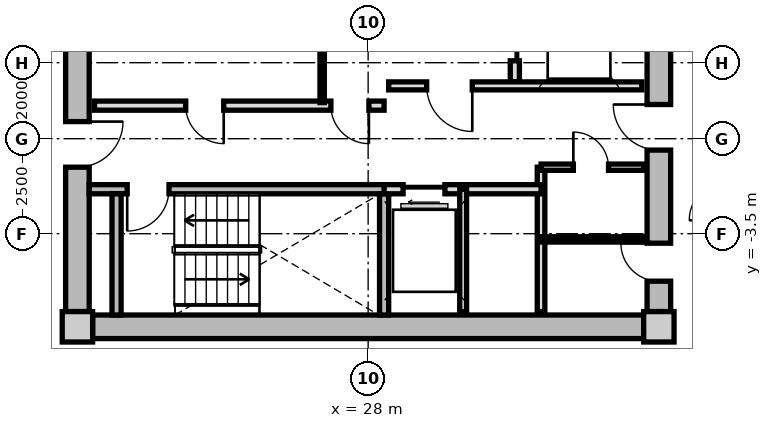
"""IFC4 building model, lengths in metres.
Left out: names, types, materials, properties, quantities, classifications, styles, units other than length and angle.
Written with IfcOpenShell. Run it as: python <this file> out.ifc"""

import sys

from ifc_helpers import new_model, si_unit, direction, frame, frame_2d, origin, origin_2d, place, context, subcontext, project, spatial, rectangle, extrude, source, transform, mapped, element, fill, save


model = new_model("IFC4")
c1 = context("Model", 3, precision=1e-05, world=origin(), true_north=direction((0.0, 1.0)))
c2 = subcontext(c1, "Body", "Model", "MODEL_VIEW")
j1 = project(units=[si_unit("LENGTHUNIT", "METRE"), si_unit("PLANEANGLEUNIT", "RADIAN")], contexts=[c1])
p1 = place(None, origin())
s1 = spatial("IfcSite", under=j1, at=p1, CompositionType="ELEMENT")
p2 = place(p1, origin())
s2 = spatial("IfcBuilding", under=s1, at=p2, CompositionType="ELEMENT")
p3 = place(p2, frame((0.0, 0.0, 152.6)))
s3 = spatial("IfcBuildingStorey", under=s2, at=p3, CompositionType="ELEMENT", Elevation=152.6)
m1 = source(origin(), c2, "Body", "SweptSolid", [
    extrude(rectangle(XDim=0.8, YDim=0.8, at=origin_2d()), origin(), (0.0, 0.0, 1.0), 3.05),
])
for number, where, z_axis, x_axis in (
    (1, (20.35, -5.95, 0.0), (0.0, 0.0, 1.0), (1.0, 0.0, 0.0)),
    (2, (35.65, -5.95, 0.0), (0.0, 0.0, 1.0), (1.0, 0.0, 0.0)),
):
    element("IfcColumn", number, at=place(p3, frame(where, z_axis=z_axis, x_axis=x_axis)), inside=s3, PredefinedType="COLUMN", context=c2, shape_type="MappedRepresentation", body=[
        mapped(m1, transform((0.0, 0.0, 0.0), x_axis=(1.0, 0.0, 0.0), y_axis=(0.0, 1.0, 0.0), z_axis=(0.0, 0.0, 1.0), scale=1.0)),
    ])
m2 = source(origin(), c2, "Body", "SweptSolid", [
    extrude(rectangle(XDim=14.5, YDim=0.62, at=frame_2d((7.25, 0.0))), origin(), (0.0, 0.0, 1.0), 2.81),
])
p4 = place(p3, frame((35.25, -5.95, 0.0), z_axis=(0.0, 0.0, 1.0), x_axis=(-1.0, 0.0, 0.0)))
e3 = element("IfcWall", 3, at=p4, inside=s3, PredefinedType="SHEAR", context=c2, shape_type="MappedRepresentation", body=[
    mapped(m2, transform((0.0, 0.0, 0.0), x_axis=(1.0, 0.0, 0.0), y_axis=(0.0, 1.0, 0.0), z_axis=(0.0, 0.0, 1.0), scale=1.0)),
])
m3 = source(origin(), c2, "Body", "SweptSolid", [
    extrude(rectangle(XDim=11.1, YDim=0.62, at=frame_2d((5.55, 0.0))), origin(), (0.0, 0.0, 1.0), 2.81),
])
p5 = place(p3, frame((20.35, -5.55, 0.0), z_axis=(0.0, 0.0, 1.0), x_axis=(0.0, 1.0, 0.0)))
e4 = element("IfcWall", 4, at=p5, inside=s3, PredefinedType="SHEAR", context=c2, shape_type="MappedRepresentation", body=[
    mapped(m3, transform((0.0, 0.0, 0.0), x_axis=(1.0, 0.0, 0.0), y_axis=(0.0, 1.0, 0.0), z_axis=(0.0, 0.0, 1.0), scale=1.0)),
])
p6 = place(p5, frame((3.8, 0.0, 0.0)))
e5 = element("IfcOpeningElement", 5, at=p6, cuts=e4, PredefinedType="OPENING", context=c2, shape_type="SweptSolid", body=[
    extrude(rectangle(XDim=1.2, YDim=2.15, at=frame_2d((0.6, 1.075))), frame((0.0, 0.32, 0.0), z_axis=(0.0, -1.0, 0.0), x_axis=(1.0, 0.0, 0.0)), (0.0, 0.0, 1.0), 0.64),
])
p7 = place(p3, frame((35.65, 5.55, 0.0), z_axis=(0.0, 0.0, 1.0), x_axis=(0.0, -1.0, 0.0)))
e6 = element("IfcWall", 6, at=p7, inside=s3, PredefinedType="SHEAR", context=c2, shape_type="MappedRepresentation", body=[
    mapped(m3, transform((0.0, 0.0, 0.0), x_axis=(1.0, 0.0, 0.0), y_axis=(0.0, 1.0, 0.0), z_axis=(0.0, 0.0, 1.0), scale=1.0)),
])
p8 = place(p7, frame((5.65, 0.0, 0.0)))
e7 = element("IfcOpeningElement", 7, at=p8, cuts=e6, PredefinedType="OPENING", context=c2, shape_type="SweptSolid", body=[
    extrude(rectangle(XDim=1.2, YDim=2.15, at=frame_2d((0.6, 1.075))), frame((0.0, 0.32, 0.0), z_axis=(0.0, -1.0, 0.0), x_axis=(1.0, 0.0, 0.0)), (0.0, 0.0, 1.0), 0.64),
])
p9 = place(p7, frame((9.3, 0.0, 0.0)))
e8 = element("IfcOpeningElement", 8, at=p9, cuts=e6, PredefinedType="OPENING", context=c2, shape_type="SweptSolid", body=[
    extrude(rectangle(XDim=1.0, YDim=2.1, at=frame_2d((0.5, 1.05))), frame((0.0, 0.32, 0.0), z_axis=(0.0, -1.0, 0.0), x_axis=(1.0, 0.0, 0.0)), (0.0, 0.0, 1.0), 0.64),
])
m4 = source(origin(), c2, "Body", "SweptSolid", [
    extrude(rectangle(XDim=7.88, YDim=0.24, at=frame_2d((3.94, 0.0))), origin(), (0.0, 0.0, 1.0), 2.81),
])
p10 = place(p3, frame((20.66, -2.33, 0.0), z_axis=(0.0, 0.0, 1.0), x_axis=(1.0, 0.0, 0.0)))
e9 = element("IfcWall", 9, at=p10, inside=s3, PredefinedType="PARTITIONING", context=c2, shape_type="MappedRepresentation", body=[
    mapped(m4, transform((0.0, 0.0, 0.0), x_axis=(1.0, 0.0, 0.0), y_axis=(0.0, 1.0, 0.0), z_axis=(0.0, 0.0, 1.0), scale=1.0)),
])
p11 = place(p10, frame((1.0, 0.0, 0.0)))
e10 = element("IfcOpeningElement", 10, at=p11, cuts=e9, PredefinedType="OPENING", context=c2, shape_type="SweptSolid", body=[
    extrude(rectangle(XDim=1.1, YDim=2.15, at=frame_2d((0.55, 1.075))), frame((0.0, 0.13, 0.0), z_axis=(0.0, -1.0, 0.0), x_axis=(1.0, 0.0, 0.0)), (0.0, 0.0, 1.0), 0.26),
])
m5 = source(origin(), c2, "Body", "SweptSolid", [
    extrude(rectangle(XDim=3.19, YDim=0.24, at=frame_2d((1.595, 0.0))), origin(), (0.0, 0.0, 1.0), 2.81),
])
for number, where, z_axis, x_axis in (
    (11, (21.38, -5.64, 0.0), (0.0, 0.0, 1.0), (0.0, 1.0, 0.0)),
    (12, (28.42, -5.64, 0.0), (0.0, 0.0, 1.0), (0.0, 1.0, 0.0)),
):
    element("IfcWall", number, at=place(p3, frame(where, z_axis=z_axis, x_axis=x_axis)), inside=s3, PredefinedType="PARTITIONING", context=c2, shape_type="MappedRepresentation", body=[
        mapped(m5, transform((0.0, 0.0, 0.0), x_axis=(1.0, 0.0, 0.0), y_axis=(0.0, 1.0, 0.0), z_axis=(0.0, 0.0, 1.0), scale=1.0)),
    ])
m6 = source(origin(), c2, "Body", "SweptSolid", [
    extrude(rectangle(XDim=5.0, YDim=0.24, at=frame_2d((2.5, 0.0))), origin(), (0.0, 0.0, 1.0), 2.795),
])
p12 = place(p3, frame((31.86, 0.5, 0.0), z_axis=(0.0, 0.0, 1.0), x_axis=(0.0, 1.0, 0.0)))
e13 = element("IfcWall", 13, at=p12, inside=s3, PredefinedType="PARTITIONING", context=c2, shape_type="MappedRepresentation", body=[
    mapped(m6, transform((0.0, 0.0, 0.0), x_axis=(1.0, 0.0, 0.0), y_axis=(0.0, 1.0, 0.0), z_axis=(0.0, 0.0, 1.0), scale=1.0)),
])
p13 = place(p12, frame((3.05, 0.0, 0.0)))
e14 = element("IfcOpeningElement", 14, at=p13, cuts=e13, PredefinedType="OPENING", context=c2, shape_type="SweptSolid", body=[
    extrude(rectangle(XDim=1.3, YDim=2.2, at=frame_2d((0.65, 1.1))), frame((0.0, 0.13, 0.0), z_axis=(0.0, -1.0, 0.0), x_axis=(1.0, 0.0, 0.0)), (0.0, 0.0, 1.0), 0.26),
])
p14 = place(p12, frame((0.55, 0.0, 0.0)))
e15 = element("IfcOpeningElement", 15, at=p14, cuts=e13, PredefinedType="OPENING", context=c2, shape_type="SweptSolid", body=[
    extrude(rectangle(XDim=1.3, YDim=2.2, at=frame_2d((0.65, 1.1))), frame((0.0, 0.13, 0.0), z_axis=(0.0, -1.0, 0.0), x_axis=(1.0, 0.0, 0.0)), (0.0, 0.0, 1.0), 0.26),
])
m7 = source(origin(), c2, "Body", "SweptSolid", [
    extrude(rectangle(XDim=6.66, YDim=0.21, at=frame_2d((3.33, 0.0))), origin(), (0.0, 0.0, 1.0), 2.795),
])
p15 = place(p3, frame((28.54, 0.39, 0.0), z_axis=(0.0, 0.0, 1.0), x_axis=(1.0, 0.0, 0.0)))
e16 = element("IfcWall", 16, at=p15, inside=s3, PredefinedType="PARTITIONING", context=c2, shape_type="MappedRepresentation", body=[
    mapped(m7, transform((0.0, 0.0, 0.0), x_axis=(1.0, 0.0, 0.0), y_axis=(0.0, 1.0, 0.0), z_axis=(0.0, 0.0, 1.0), scale=1.0)),
])
p16 = place(p15, frame((1.0, 0.0, 0.0)))
e17 = element("IfcOpeningElement", 17, at=p16, cuts=e16, PredefinedType="OPENING", context=c2, shape_type="SweptSolid", body=[
    extrude(rectangle(XDim=1.2, YDim=2.15, at=frame_2d((0.6, 1.075))), frame((0.0, 0.115, 0.0), z_axis=(0.0, -1.0, 0.0), x_axis=(1.0, 0.0, 0.0)), (0.0, 0.0, 1.0), 0.23),
])
m8 = source(origin(), c2, "Body", "SweptSolid", [
    extrude(rectangle(XDim=7.62, YDim=0.24, at=frame_2d((3.81, 0.0))), origin(), (0.0, 0.0, 1.0), 2.795),
])
p17 = place(p3, frame((20.8, -0.13, 0.0), z_axis=(0.0, 0.0, 1.0), x_axis=(1.0, 0.0, 0.0)))
e18 = element("IfcWall", 18, at=p17, inside=s3, PredefinedType="PARTITIONING", context=c2, shape_type="MappedRepresentation", body=[
    mapped(m8, transform((0.0, 0.0, 0.0), x_axis=(1.0, 0.0, 0.0), y_axis=(0.0, 1.0, 0.0), z_axis=(0.0, 0.0, 1.0), scale=1.0)),
])
p18 = place(p17, frame((6.22, 0.0, 0.0)))
e19 = element("IfcOpeningElement", 19, at=p18, cuts=e18, PredefinedType="OPENING", context=c2, shape_type="SweptSolid", body=[
    extrude(rectangle(XDim=1.0, YDim=2.1, at=frame_2d((0.5, 1.05))), frame((0.0, 0.13, 0.0), z_axis=(0.0, -1.0, 0.0), x_axis=(1.0, 0.0, 0.0)), (0.0, 0.0, 1.0), 0.26),
])
p19 = place(p17, frame((2.4, 0.0, 0.0)))
e20 = element("IfcOpeningElement", 20, at=p19, cuts=e18, PredefinedType="OPENING", context=c2, shape_type="SweptSolid", body=[
    extrude(rectangle(XDim=1.0, YDim=2.1, at=frame_2d((0.5, 1.05))), frame((0.0, 0.13, 0.0), z_axis=(0.0, -1.0, 0.0), x_axis=(1.0, 0.0, 0.0)), (0.0, 0.0, 1.0), 0.26),
])
m9 = source(origin(), c2, "Body", "SweptSolid", [
    extrude(rectangle(XDim=2.33, YDim=0.115, at=frame_2d((1.165, 0.0))), origin(), (0.0, 0.0, 1.0), 2.795),
])
p20 = place(p3, frame((26.79, -0.05, 0.0), z_axis=(0.0, 0.0, 1.0), x_axis=(0.0, 1.0, 0.0)))
e21 = element("IfcWall", 21, at=p20, inside=s3, PredefinedType="PARTITIONING", context=c2, shape_type="MappedRepresentation", body=[
    mapped(m9, transform((0.0, 0.0, 0.0), x_axis=(1.0, 0.0, 0.0), y_axis=(0.0, 1.0, 0.0), z_axis=(0.0, 0.0, 1.0), scale=1.0)),
])
m10 = source(origin(), c2, "Body", "SweptSolid", [
    extrude(rectangle(XDim=3.8, YDim=0.2, at=frame_2d((1.9, 0.0))), origin(), (0.0, 0.0, 1.0), 2.795),
])
p21 = place(p3, frame((32.55, -5.55, 0.0), z_axis=(0.0, 0.0, 1.0), x_axis=(0.0, 1.0, 0.0)))
e22 = element("IfcWall", 22, at=p21, inside=s3, PredefinedType="PARTITIONING", context=c2, shape_type="MappedRepresentation", body=[
    mapped(m10, transform((0.0, 0.0, 0.0), x_axis=(1.0, 0.0, 0.0), y_axis=(0.0, 1.0, 0.0), z_axis=(0.0, 0.0, 1.0), scale=1.0)),
])
m11 = source(origin(), c2, "Body", "SweptSolid", [
    extrude(rectangle(XDim=4.13, YDim=0.24, at=frame_2d((2.065, 0.0))), origin(), (0.0, 0.0, 1.0), 2.795),
])
p22 = place(p3, frame((28.42, -2.33, 0.0), z_axis=(0.0, 0.0, 1.0), x_axis=(1.0, 0.0, 0.0)))
e23 = element("IfcWall", 23, at=p22, inside=s3, PredefinedType="PARTITIONING", context=c2, shape_type="MappedRepresentation", body=[
    mapped(m11, transform((0.0, 0.0, 0.0), x_axis=(1.0, 0.0, 0.0), y_axis=(0.0, 1.0, 0.0), z_axis=(0.0, 0.0, 1.0), scale=1.0)),
])
p23 = place(p22, frame((0.5, 0.0, 0.0)))
e24 = element("IfcOpeningElement", 24, at=p23, cuts=e23, PredefinedType="OPENING", context=c2, shape_type="SweptSolid", body=[
    extrude(rectangle(XDim=1.1, YDim=2.2, at=frame_2d((0.55, 1.1))), frame((0.0, 0.13, 0.0), z_axis=(0.0, -1.0, 0.0), x_axis=(1.0, 0.0, 0.0)), (0.0, 0.0, 1.0), 0.26),
])
m12 = source(origin(), c2, "Body", "SweptSolid", [
    extrude(rectangle(XDim=3.22, YDim=0.18, at=frame_2d((1.61, 0.0))), origin(), (0.0, 0.0, 1.0), 2.795),
])
p24 = place(p3, frame((30.5, -5.55, 0.0), z_axis=(0.0, 0.0, 1.0), x_axis=(0.0, 1.0, 0.0)))
e25 = element("IfcWall", 25, at=p24, inside=s3, PredefinedType="PARTITIONING", context=c2, shape_type="MappedRepresentation", body=[
    mapped(m12, transform((0.0, 0.0, 0.0), x_axis=(1.0, 0.0, 0.0), y_axis=(0.0, 1.0, 0.0), z_axis=(0.0, 0.0, 1.0), scale=1.0)),
])
m13 = source(origin(), c2, "Body", "SweptSolid", [
    extrude(rectangle(XDim=2.7, YDim=0.165, at=frame_2d((1.35, 0.0))), origin(), (0.0, 0.0, 1.0), 2.795),
])
p25 = place(p3, frame((32.55, -1.75, 0.0), z_axis=(0.0, 0.0, 1.0), x_axis=(1.0, 0.0, 0.0)))
e26 = element("IfcWall", 26, at=p25, inside=s3, PredefinedType="PARTITIONING", context=c2, shape_type="MappedRepresentation", body=[
    mapped(m13, transform((0.0, 0.0, 0.0), x_axis=(1.0, 0.0, 0.0), y_axis=(0.0, 1.0, 0.0), z_axis=(0.0, 0.0, 1.0), scale=1.0)),
])
p26 = place(p25, frame((0.85, 0.0, 0.0)))
e27 = element("IfcOpeningElement", 27, at=p26, cuts=e26, PredefinedType="OPENING", context=c2, shape_type="SweptSolid", body=[
    extrude(rectangle(XDim=0.925, YDim=2.1, at=frame_2d((0.462, 1.05))), frame((0.0, 0.093, 0.0), z_axis=(0.0, -1.0, 0.0), x_axis=(1.0, 0.0, 0.0)), (0.0, 0.0, 1.0), 0.185),
])
m14 = source(origin(), c2, "Body", "SweptSolid", [
    extrude(rectangle(XDim=2.7, YDim=0.14, at=frame_2d((1.35, 0.0))), origin(), (0.0, 0.0, 1.0), 2.795),
])
p27 = place(p3, frame((32.55, -3.65, 0.0), z_axis=(0.0, 0.0, 1.0), x_axis=(1.0, 0.0, 0.0)))
e28 = element("IfcWall", 28, at=p27, inside=s3, PredefinedType="PARTITIONING", context=c2, shape_type="MappedRepresentation", body=[
    mapped(m14, transform((0.0, 0.0, 0.0), x_axis=(1.0, 0.0, 0.0), y_axis=(0.0, 1.0, 0.0), z_axis=(0.0, 0.0, 1.0), scale=1.0)),
])
m15 = source(origin(), c2, "Body", "SweptSolid", [
    extrude(rectangle(XDim=1.1, YDim=2.15, at=frame_2d((0.55, 1.075))), frame((0.0, 0.025, 0.0), z_axis=(0.0, -1.0, 0.0), x_axis=(1.0, 0.0, 0.0)), (0.0, 0.0, 1.0), 0.05),
])
p28 = place(p11, frame((1.1, 0.0, 0.0), z_axis=(0.0, 0.0, 1.0), x_axis=(-1.0, 0.0, 0.0)))
e29 = element("IfcDoor", 29, at=p28, inside=s3, OperationType="SINGLE_SWING_RIGHT", PredefinedType="DOOR", context=c2, shape_type="MappedRepresentation", body=[
    mapped(m15, transform((0.0, 0.0, 0.0), x_axis=(1.0, 0.0, 0.0), y_axis=(0.0, 1.0, 0.0), z_axis=(0.0, 0.0, 1.0), scale=1.0)),
])
fill(e10, e29)
m16 = source(origin(), c2, "Body", "SweptSolid", [
    extrude(rectangle(XDim=1.3, YDim=2.2, at=frame_2d((0.65, 1.1))), frame((0.0, 0.025, 0.0), z_axis=(0.0, -1.0, 0.0), x_axis=(1.0, 0.0, 0.0)), (0.0, 0.0, 1.0), 0.05),
])
p29 = place(p14, origin())
e30 = element("IfcDoor", 30, at=p29, inside=s3, OperationType="SLIDING_TO_RIGHT", PredefinedType="DOOR", context=c2, shape_type="MappedRepresentation", body=[
    mapped(m16, transform((0.0, 0.0, 0.0), x_axis=(1.0, 0.0, 0.0), y_axis=(0.0, 1.0, 0.0), z_axis=(0.0, 0.0, 1.0), scale=1.0)),
])
fill(e15, e30)
m17 = source(origin(), c2, "Body", "SweptSolid", [
    extrude(rectangle(XDim=1.2, YDim=2.15, at=frame_2d((0.6, 1.075))), frame((0.0, 0.025, 0.0), z_axis=(0.0, -1.0, 0.0), x_axis=(1.0, 0.0, 0.0)), (0.0, 0.0, 1.0), 0.05),
])
p30 = place(p16, frame((1.2, 0.0, 0.0), z_axis=(0.0, 0.0, 1.0), x_axis=(-1.0, 0.0, 0.0)))
e31 = element("IfcDoor", 31, at=p30, inside=s3, OperationType="SINGLE_SWING_LEFT", PredefinedType="DOOR", context=c2, shape_type="MappedRepresentation", body=[
    mapped(m17, transform((0.0, 0.0, 0.0), x_axis=(1.0, 0.0, 0.0), y_axis=(0.0, 1.0, 0.0), z_axis=(0.0, 0.0, 1.0), scale=1.0)),
])
fill(e17, e31)
p31 = place(p6, frame((1.2, 0.0, 0.0), z_axis=(0.0, 0.0, 1.0), x_axis=(-1.0, 0.0, 0.0)))
e32 = element("IfcDoor", 32, at=p31, inside=s3, OperationType="SINGLE_SWING_LEFT", PredefinedType="DOOR", context=c2, shape_type="MappedRepresentation", body=[
    mapped(m17, transform((0.0, 0.0, 0.0), x_axis=(1.0, 0.0, 0.0), y_axis=(0.0, 1.0, 0.0), z_axis=(0.0, 0.0, 1.0), scale=1.0)),
])
fill(e5, e32)
p32 = place(p8, frame((1.2, 0.0, 0.0), z_axis=(0.0, 0.0, 1.0), x_axis=(-1.0, 0.0, 0.0)))
e33 = element("IfcDoor", 33, at=p32, inside=s3, OperationType="SINGLE_SWING_RIGHT", PredefinedType="DOOR", context=c2, shape_type="MappedRepresentation", body=[
    mapped(m17, transform((0.0, 0.0, 0.0), x_axis=(1.0, 0.0, 0.0), y_axis=(0.0, 1.0, 0.0), z_axis=(0.0, 0.0, 1.0), scale=1.0)),
])
fill(e7, e33)
m18 = source(origin(), c2, "Body", "SweptSolid", [
    extrude(rectangle(XDim=1.0, YDim=2.1, at=frame_2d((0.5, 1.05))), frame((0.0, 0.025, 0.0), z_axis=(0.0, -1.0, 0.0), x_axis=(1.0, 0.0, 0.0)), (0.0, 0.0, 1.0), 0.05),
])
p33 = place(p18, frame((1.0, 0.0, 0.0), z_axis=(0.0, 0.0, 1.0), x_axis=(-1.0, 0.0, 0.0)))
e34 = element("IfcDoor", 34, at=p33, inside=s3, OperationType="SINGLE_SWING_LEFT", PredefinedType="DOOR", context=c2, shape_type="MappedRepresentation", body=[
    mapped(m18, transform((0.0, 0.0, 0.0), x_axis=(1.0, 0.0, 0.0), y_axis=(0.0, 1.0, 0.0), z_axis=(0.0, 0.0, 1.0), scale=1.0)),
])
fill(e19, e34)
p34 = place(p19, frame((1.0, 0.0, 0.0), z_axis=(0.0, 0.0, 1.0), x_axis=(-1.0, 0.0, 0.0)))
e35 = element("IfcDoor", 35, at=p34, inside=s3, OperationType="SINGLE_SWING_LEFT", PredefinedType="DOOR", context=c2, shape_type="MappedRepresentation", body=[
    mapped(m18, transform((0.0, 0.0, 0.0), x_axis=(1.0, 0.0, 0.0), y_axis=(0.0, 1.0, 0.0), z_axis=(0.0, 0.0, 1.0), scale=1.0)),
])
fill(e20, e35)
m19 = source(origin(), c2, "Body", "SweptSolid", [
    extrude(rectangle(XDim=1.1, YDim=2.2, at=frame_2d((0.55, 1.1))), frame((0.0, 0.025, 0.0), z_axis=(0.0, -1.0, 0.0), x_axis=(1.0, 0.0, 0.0)), (0.0, 0.0, 1.0), 0.05),
])
p35 = place(p23, frame((1.1, 0.0, 0.0), z_axis=(0.0, 0.0, 1.0), x_axis=(-1.0, 0.0, 0.0)))
e36 = element("IfcDoor", 36, at=p35, inside=s3, OperationType="SLIDING_TO_LEFT", PredefinedType="DOOR", context=c2, shape_type="MappedRepresentation", body=[
    mapped(m19, transform((0.0, 0.0, 0.0), x_axis=(1.0, 0.0, 0.0), y_axis=(0.0, 1.0, 0.0), z_axis=(0.0, 0.0, 1.0), scale=1.0)),
])
fill(e24, e36)
m20 = source(origin(), c2, "Body", "SweptSolid", [
    extrude(rectangle(XDim=0.925, YDim=2.1, at=frame_2d((0.462, 1.05))), frame((0.0, 0.025, 0.0), z_axis=(0.0, -1.0, 0.0), x_axis=(1.0, 0.0, 0.0)), (0.0, 0.0, 1.0), 0.05),
])
p36 = place(p26, origin())
e37 = element("IfcDoor", 37, at=p36, inside=s3, OperationType="SINGLE_SWING_LEFT", PredefinedType="DOOR", context=c2, shape_type="MappedRepresentation", body=[
    mapped(m20, transform((0.0, 0.0, 0.0), x_axis=(1.0, 0.0, 0.0), y_axis=(0.0, 1.0, 0.0), z_axis=(0.0, 0.0, 1.0), scale=1.0)),
])
fill(e27, e37)
p37 = place(p9, frame((1.0, 0.0, 0.0), z_axis=(0.0, 0.0, 1.0), x_axis=(-1.0, 0.0, 0.0)))
e38 = element("IfcDoor", 38, at=p37, inside=s3, OperationType="SINGLE_SWING_RIGHT", PredefinedType="DOOR", context=c2, shape_type="MappedRepresentation", body=[
    mapped(m18, transform((0.0, 0.0, 0.0), x_axis=(1.0, 0.0, 0.0), y_axis=(0.0, 1.0, 0.0), z_axis=(0.0, 0.0, 1.0), scale=1.0)),
])
fill(e8, e38)
save(model, sys.argv[1])
